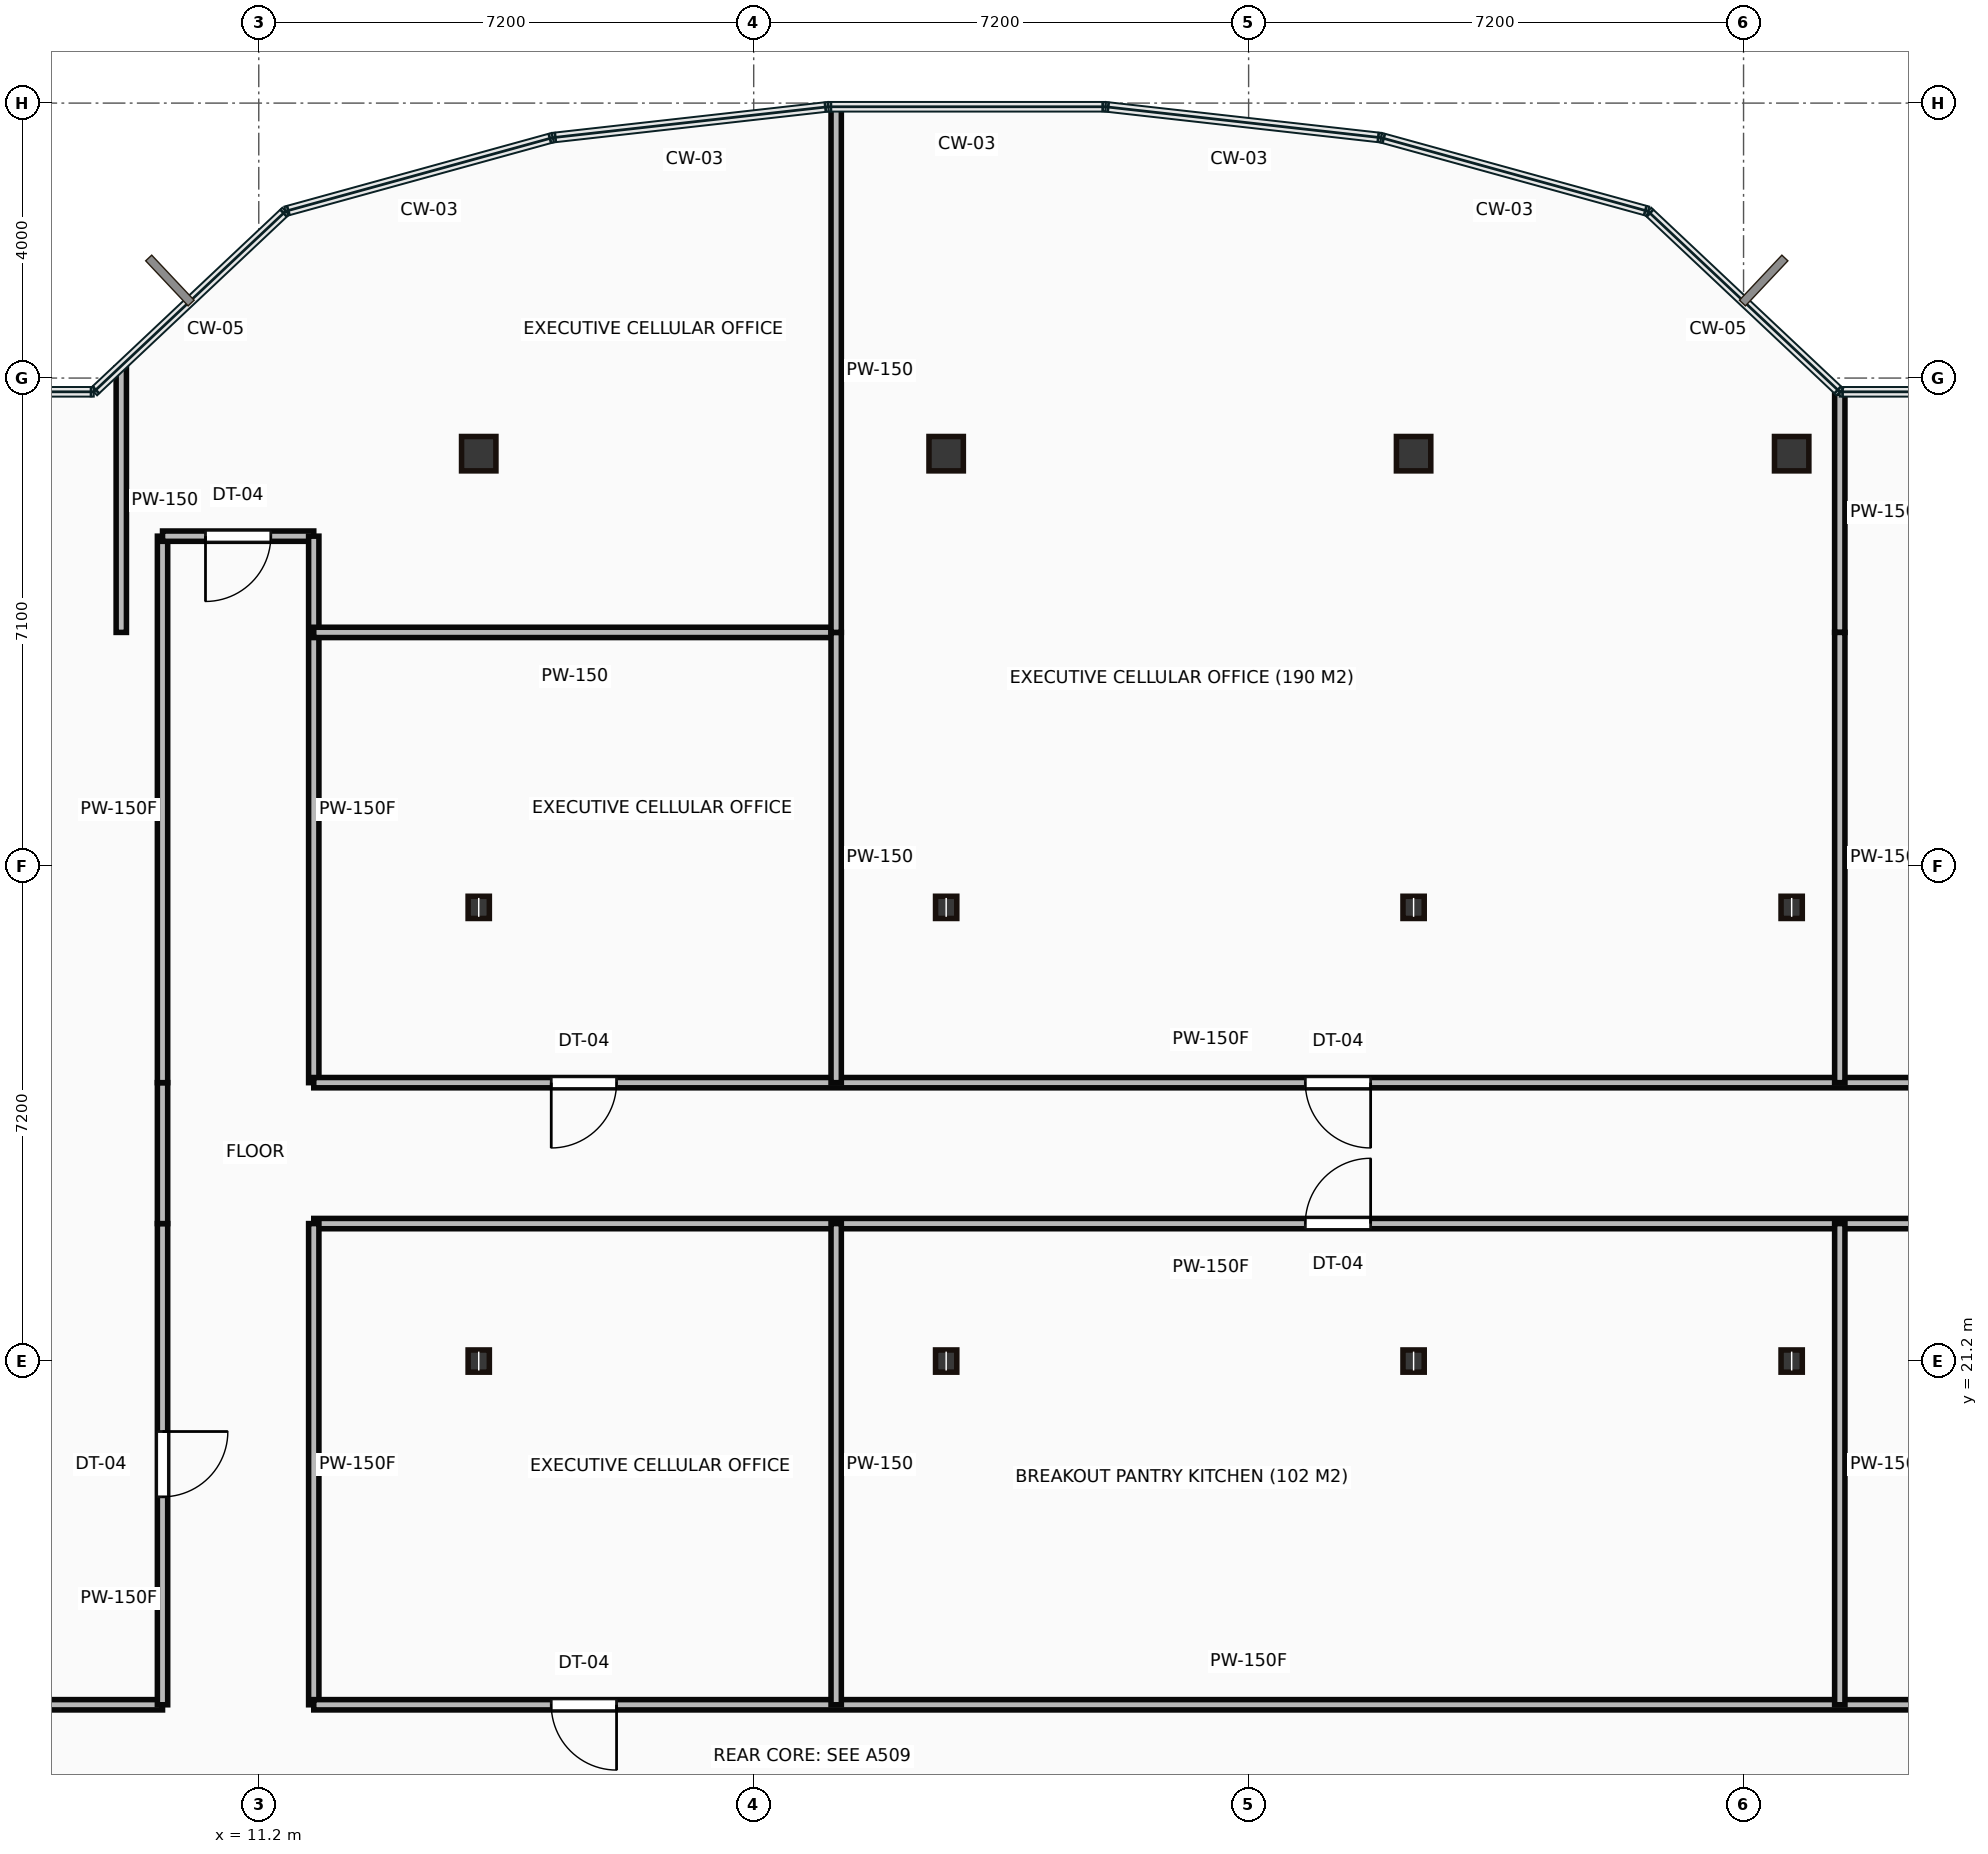
"""IFC4 building model, lengths in metres.
Left out: names, types, materials, properties, quantities, classifications, styles, units other than length and angle.
Written with IfcOpenShell. Run it as: python <this file> out.ifc"""

import sys

from ifc_helpers import new_model, si_unit, direction, frame, frame_2d, origin, origin_2d, place, context, subcontext, project, spatial, rectangle, hollow_rectangle, i_section, extrude, source, transform, mapped, element, fill, save


model = new_model("IFC4")
c1 = context("Model", 3, precision=1e-05, world=origin(), true_north=direction((0.0, 1.0)))
c2 = subcontext(c1, "Body", "Model", "MODEL_VIEW")
j1 = project(units=[si_unit("LENGTHUNIT", "METRE"), si_unit("PLANEANGLEUNIT", "RADIAN")], contexts=[c1])
p1 = place(None, origin())
s1 = spatial("IfcSite", under=j1, at=p1, CompositionType="ELEMENT")
p2 = place(p1, origin())
s2 = spatial("IfcBuilding", under=s1, at=p2, CompositionType="ELEMENT")
p3 = place(p2, frame((0.0, 0.0, 210.5)))
s3 = spatial("IfcBuildingStorey", under=s2, at=p3, CompositionType="ELEMENT", Elevation=210.5)
m1 = source(origin(), c2, "Body", "SweptSolid", [
    extrude(i_section(OverallWidth=0.309, OverallDepth=0.323, WebThickness=0.014, FlangeThickness=0.023, at=origin_2d()), origin(), (0.0, 0.0, 1.0), 3.65),
])
for number, where, z_axis, x_axis in (
    (1, (14.4, 21.2, 0.0), (0.0, 0.0, 1.0), (1.0, 0.0, 0.0)),
    (2, (14.4, 27.8, 0.0), (0.0, 0.0, 1.0), (1.0, 0.0, 0.0)),
):
    element("IfcColumn", number, at=place(p3, frame(where, z_axis=z_axis, x_axis=x_axis)), inside=s3, PredefinedType="COLUMN", context=c2, shape_type="MappedRepresentation", body=[
        mapped(m1, transform((0.0, 0.0, 0.0))),
    ])
m2 = source(origin(), c2, "Body", "SweptSolid", [
    extrude(hollow_rectangle(XDim=0.5, YDim=0.5, WallThickness=0.022, at=origin_2d()), origin(), (0.0, 0.0, 1.0), 3.65),
])
p4 = place(p3, frame((14.4, 34.4, 0.0), z_axis=(0.0, 0.0, 1.0), x_axis=(1.0, 0.0, 0.0)))
e3 = element("IfcColumn", 3, at=p4, inside=s3, PredefinedType="COLUMN", context=c2, shape_type="MappedRepresentation", body=[
    mapped(m2, transform((0.0, 0.0, 0.0))),
])
for number, where, z_axis, x_axis in (
    (4, (21.2, 21.2, 0.0), (0.0, 0.0, 1.0), (1.0, 0.0, 0.0)),
    (5, (21.2, 27.8, 0.0), (0.0, 0.0, 1.0), (1.0, 0.0, 0.0)),
):
    element("IfcColumn", number, at=place(p3, frame(where, z_axis=z_axis, x_axis=x_axis)), inside=s3, PredefinedType="COLUMN", context=c2, shape_type="MappedRepresentation", body=[
        mapped(m1, transform((0.0, 0.0, 0.0))),
    ])
p5 = place(p3, frame((21.2, 34.4, 0.0), z_axis=(0.0, 0.0, 1.0), x_axis=(1.0, 0.0, 0.0)))
e6 = element("IfcColumn", 6, at=p5, inside=s3, PredefinedType="COLUMN", context=c2, shape_type="MappedRepresentation", body=[
    mapped(m2, transform((0.0, 0.0, 0.0))),
])
for number, where, z_axis, x_axis in (
    (7, (28.0, 21.2, 0.0), (0.0, 0.0, 1.0), (1.0, 0.0, 0.0)),
    (8, (28.0, 27.8, 0.0), (0.0, 0.0, 1.0), (1.0, 0.0, 0.0)),
):
    element("IfcColumn", number, at=place(p3, frame(where, z_axis=z_axis, x_axis=x_axis)), inside=s3, PredefinedType="COLUMN", context=c2, shape_type="MappedRepresentation", body=[
        mapped(m1, transform((0.0, 0.0, 0.0))),
    ])
p6 = place(p3, frame((28.0, 34.4, 0.0), z_axis=(0.0, 0.0, 1.0), x_axis=(1.0, 0.0, 0.0)))
e9 = element("IfcColumn", 9, at=p6, inside=s3, PredefinedType="COLUMN", context=c2, shape_type="MappedRepresentation", body=[
    mapped(m2, transform((0.0, 0.0, 0.0))),
])
for number, where, z_axis, x_axis in (
    (10, (33.5, 21.2, 0.0), (0.0, 0.0, 1.0), (1.0, 0.0, 0.0)),
    (11, (33.5, 27.8, 0.0), (0.0, 0.0, 1.0), (1.0, 0.0, 0.0)),
):
    element("IfcColumn", number, at=place(p3, frame(where, z_axis=z_axis, x_axis=x_axis)), inside=s3, PredefinedType="COLUMN", context=c2, shape_type="MappedRepresentation", body=[
        mapped(m1, transform((0.0, 0.0, 0.0))),
    ])
p7 = place(p3, frame((33.5, 34.4, 0.0), z_axis=(0.0, 0.0, 1.0), x_axis=(1.0, 0.0, 0.0)))
e12 = element("IfcColumn", 12, at=p7, inside=s3, PredefinedType="COLUMN", context=c2, shape_type="MappedRepresentation", body=[
    mapped(m2, transform((0.0, 0.0, 0.0))),
])
m3 = source(origin(), c2, "Body", "SweptSolid", [
    extrude(rectangle(XDim=5.2, YDim=0.15, at=frame_2d((2.6, 0.0))), origin(), (0.0, 0.0, 1.0), 3.4),
])
p8 = place(p3, frame((4.6, 16.2, 0.0), z_axis=(0.0, 0.0, 1.0), x_axis=(1.0, 0.0, 0.0)))
e13 = element("IfcWall", 13, at=p8, inside=s3, PredefinedType="PARTITIONING", context=c2, shape_type="MappedRepresentation", body=[
    mapped(m3, transform((0.0, 0.0, 0.0))),
])
m4 = source(origin(), c2, "Body", "SweptSolid", [
    extrude(rectangle(XDim=7.0, YDim=0.15, at=frame_2d((3.5, 0.0))), origin(), (0.0, 0.0, 1.0), 3.4),
])
p9 = place(p3, frame((9.8, 16.2, 0.0), z_axis=(0.0, 0.0, 1.0), x_axis=(0.0, 1.0, 0.0)))
e14 = element("IfcWall", 14, at=p9, inside=s3, PredefinedType="PARTITIONING", context=c2, shape_type="MappedRepresentation", body=[
    mapped(m4, transform((0.0, 0.0, 0.0))),
])
p10 = place(p9, frame((3.025, 0.0, 0.0)))
e15 = element("IfcOpeningElement", 15, at=p10, cuts=e14, PredefinedType="OPENING", context=c2, shape_type="SweptSolid", body=[
    extrude(rectangle(XDim=0.95, YDim=2.15, at=frame_2d((0.475, 1.075))), frame((0.0, 0.085, 0.0), z_axis=(0.0, -1.0, 0.0), x_axis=(1.0, 0.0, 0.0)), (0.0, 0.0, 1.0), 0.17),
])
m5 = source(origin(), c2, "Body", "SweptSolid", [
    extrude(rectangle(XDim=2.05, YDim=0.15, at=frame_2d((1.025, 0.0))), origin(), (0.0, 0.0, 1.0), 3.4),
])
p11 = place(p3, frame((9.8, 23.2, 0.0), z_axis=(0.0, 0.0, 1.0), x_axis=(0.0, 1.0, 0.0)))
e16 = element("IfcWall", 16, at=p11, inside=s3, PredefinedType="PARTITIONING", context=c2, shape_type="MappedRepresentation", body=[
    mapped(m5, transform((0.0, 0.0, 0.0))),
])
m6 = source(origin(), c2, "Body", "SweptSolid", [
    extrude(rectangle(XDim=7.95, YDim=0.15, at=frame_2d((3.975, 0.0))), origin(), (0.0, 0.0, 1.0), 3.4),
])
p12 = place(p3, frame((9.8, 25.25, 0.0), z_axis=(0.0, 0.0, 1.0), x_axis=(0.0, 1.0, 0.0)))
e17 = element("IfcWall", 17, at=p12, inside=s3, PredefinedType="PARTITIONING", context=c2, shape_type="MappedRepresentation", body=[
    mapped(m6, transform((0.0, 0.0, 0.0))),
])
m7 = source(origin(), c2, "Body", "SweptSolid", [
    extrude(rectangle(XDim=2.2, YDim=0.15, at=frame_2d((1.1, 0.0))), origin(), (0.0, 0.0, 1.0), 3.4),
])
p13 = place(p3, frame((9.8, 33.2, 0.0), z_axis=(0.0, 0.0, 1.0), x_axis=(1.0, 0.0, 0.0)))
e18 = element("IfcWall", 18, at=p13, inside=s3, PredefinedType="PARTITIONING", context=c2, shape_type="MappedRepresentation", body=[
    mapped(m7, transform((0.0, 0.0, 0.0))),
])
p14 = place(p13, frame((0.625, 0.0, 0.0)))
e19 = element("IfcOpeningElement", 19, at=p14, cuts=e18, PredefinedType="OPENING", context=c2, shape_type="SweptSolid", body=[
    extrude(rectangle(XDim=0.95, YDim=2.15, at=frame_2d((0.475, 1.075))), frame((0.0, 0.085, 0.0), z_axis=(0.0, -1.0, 0.0), x_axis=(1.0, 0.0, 0.0)), (0.0, 0.0, 1.0), 0.17),
])
p15 = place(p3, frame((12.0, 33.2, 0.0), z_axis=(0.0, 0.0, 1.0), x_axis=(0.0, -1.0, 0.0)))
e20 = element("IfcWall", 20, at=p15, inside=s3, PredefinedType="PARTITIONING", context=c2, shape_type="MappedRepresentation", body=[
    mapped(m6, transform((0.0, 0.0, 0.0))),
])
m8 = source(origin(), c2, "Body", "SweptSolid", [
    extrude(rectangle(XDim=26.1, YDim=0.15, at=frame_2d((13.05, 0.0))), origin(), (0.0, 0.0, 1.0), 3.4),
])
p16 = place(p3, frame((12.0, 25.25, 0.0), z_axis=(0.0, 0.0, 1.0), x_axis=(1.0, 0.0, 0.0)))
e21 = element("IfcWall", 21, at=p16, inside=s3, PredefinedType="PARTITIONING", context=c2, shape_type="MappedRepresentation", body=[
    mapped(m8, transform((0.0, 0.0, 0.0))),
])
p17 = place(p16, frame((3.455, 0.0, 0.0)))
e22 = element("IfcOpeningElement", 22, at=p17, cuts=e21, PredefinedType="OPENING", context=c2, shape_type="SweptSolid", body=[
    extrude(rectangle(XDim=0.95, YDim=2.15, at=frame_2d((0.475, 1.075))), frame((0.0, 0.085, 0.0), z_axis=(0.0, -1.0, 0.0), x_axis=(1.0, 0.0, 0.0)), (0.0, 0.0, 1.0), 0.17),
])
p18 = place(p16, frame((14.425, 0.0, 0.0)))
e23 = element("IfcOpeningElement", 23, at=p18, cuts=e21, PredefinedType="OPENING", context=c2, shape_type="SweptSolid", body=[
    extrude(rectangle(XDim=0.95, YDim=2.15, at=frame_2d((0.475, 1.075))), frame((0.0, 0.085, 0.0), z_axis=(0.0, -1.0, 0.0), x_axis=(1.0, 0.0, 0.0)), (0.0, 0.0, 1.0), 0.17),
])
p19 = place(p16, frame((23.545, 0.0, 0.0)))
e24 = element("IfcOpeningElement", 24, at=p19, cuts=e21, PredefinedType="OPENING", context=c2, shape_type="SweptSolid", body=[
    extrude(rectangle(XDim=0.95, YDim=2.15, at=frame_2d((0.475, 1.075))), frame((0.0, 0.085, 0.0), z_axis=(0.0, -1.0, 0.0), x_axis=(1.0, 0.0, 0.0)), (0.0, 0.0, 1.0), 0.17),
])
p20 = place(p3, frame((38.1, 23.2, 0.0), z_axis=(0.0, 0.0, 1.0), x_axis=(-1.0, 0.0, 0.0)))
e25 = element("IfcWall", 25, at=p20, inside=s3, PredefinedType="PARTITIONING", context=c2, shape_type="MappedRepresentation", body=[
    mapped(m8, transform((0.0, 0.0, 0.0))),
])
p21 = place(p20, frame((10.725, 0.0, 0.0)))
e26 = element("IfcOpeningElement", 26, at=p21, cuts=e25, PredefinedType="OPENING", context=c2, shape_type="SweptSolid", body=[
    extrude(rectangle(XDim=0.95, YDim=2.15, at=frame_2d((0.475, 1.075))), frame((0.0, 0.085, 0.0), z_axis=(0.0, -1.0, 0.0), x_axis=(1.0, 0.0, 0.0)), (0.0, 0.0, 1.0), 0.17),
])
p22 = place(p3, frame((12.0, 23.2, 0.0), z_axis=(0.0, 0.0, 1.0), x_axis=(0.0, -1.0, 0.0)))
e27 = element("IfcWall", 27, at=p22, inside=s3, PredefinedType="PARTITIONING", context=c2, shape_type="MappedRepresentation", body=[
    mapped(m4, transform((0.0, 0.0, 0.0))),
])
m9 = source(origin(), c2, "Body", "SweptSolid", [
    extrude(rectangle(XDim=27.2, YDim=0.15, at=frame_2d((13.6, 0.0))), origin(), (0.0, 0.0, 1.0), 3.4),
])
p23 = place(p3, frame((12.0, 16.2, 0.0), z_axis=(0.0, 0.0, 1.0), x_axis=(1.0, 0.0, 0.0)))
e28 = element("IfcWall", 28, at=p23, inside=s3, PredefinedType="PARTITIONING", context=c2, shape_type="MappedRepresentation", body=[
    mapped(m9, transform((0.0, 0.0, 0.0))),
])
p24 = place(p23, frame((3.455, 0.0, 0.0)))
e29 = element("IfcOpeningElement", 29, at=p24, cuts=e28, PredefinedType="OPENING", context=c2, shape_type="SweptSolid", body=[
    extrude(rectangle(XDim=0.95, YDim=2.15, at=frame_2d((0.475, 1.075))), frame((0.0, 0.085, 0.0), z_axis=(0.0, -1.0, 0.0), x_axis=(1.0, 0.0, 0.0)), (0.0, 0.0, 1.0), 0.17),
])
p25 = place(p23, frame((24.095, 0.0, 0.0)))
e30 = element("IfcOpeningElement", 30, at=p25, cuts=e28, PredefinedType="OPENING", context=c2, shape_type="SweptSolid", body=[
    extrude(rectangle(XDim=0.95, YDim=2.15, at=frame_2d((0.475, 1.075))), frame((0.0, 0.085, 0.0), z_axis=(0.0, -1.0, 0.0), x_axis=(1.0, 0.0, 0.0)), (0.0, 0.0, 1.0), 0.17),
])
m10 = source(origin(), c2, "Body", "SweptSolid", [
    extrude(rectangle(XDim=3.849, YDim=0.15, at=frame_2d((1.925, 0.0))), origin(), (0.0, 0.0, 1.0), 3.4),
])
p26 = place(p3, frame((9.2, 35.649, 0.0), z_axis=(0.0, 0.0, 1.0), x_axis=(0.0, -1.0, 0.0)))
e31 = element("IfcWall", 31, at=p26, inside=s3, PredefinedType="PARTITIONING", context=c2, shape_type="MappedRepresentation", body=[
    mapped(m10, transform((0.0, 0.0, 0.0))),
])
m11 = source(origin(), c2, "Body", "SweptSolid", [
    extrude(rectangle(XDim=7.6, YDim=0.15, at=frame_2d((3.8, 0.0))), origin(), (0.0, 0.0, 1.0), 3.4),
])
p27 = place(p3, frame((19.6, 31.8, 0.0), z_axis=(0.0, 0.0, 1.0), x_axis=(-1.0, 0.0, 0.0)))
e32 = element("IfcWall", 32, at=p27, inside=s3, PredefinedType="PARTITIONING", context=c2, shape_type="MappedRepresentation", body=[
    mapped(m11, transform((0.0, 0.0, 0.0))),
])
p28 = place(p3, frame((19.6, 23.2, 0.0), z_axis=(0.0, 0.0, 1.0), x_axis=(0.0, -1.0, 0.0)))
e33 = element("IfcWall", 33, at=p28, inside=s3, PredefinedType="PARTITIONING", context=c2, shape_type="MappedRepresentation", body=[
    mapped(m4, transform((0.0, 0.0, 0.0))),
])
m12 = source(origin(), c2, "Body", "SweptSolid", [
    extrude(rectangle(XDim=6.55, YDim=0.15, at=frame_2d((3.275, 0.0))), origin(), (0.0, 0.0, 1.0), 3.4),
])
p29 = place(p3, frame((19.6, 31.8, 0.0), z_axis=(0.0, 0.0, 1.0), x_axis=(0.0, -1.0, 0.0)))
e34 = element("IfcWall", 34, at=p29, inside=s3, PredefinedType="PARTITIONING", context=c2, shape_type="MappedRepresentation", body=[
    mapped(m12, transform((0.0, 0.0, 0.0))),
])
m13 = source(origin(), c2, "Body", "SweptSolid", [
    extrude(rectangle(XDim=7.627, YDim=0.15, at=frame_2d((3.813, 0.0))), origin(), (0.0, 0.0, 1.0), 3.4),
])
p30 = place(p3, frame((19.6, 39.427, 0.0), z_axis=(0.0, 0.0, 1.0), x_axis=(0.0, -1.0, 0.0)))
e35 = element("IfcWall", 35, at=p30, inside=s3, PredefinedType="PARTITIONING", context=c2, shape_type="MappedRepresentation", body=[
    mapped(m13, transform((0.0, 0.0, 0.0))),
])
p31 = place(p3, frame((34.2, 23.2, 0.0), z_axis=(0.0, 0.0, 1.0), x_axis=(0.0, -1.0, 0.0)))
e36 = element("IfcWall", 36, at=p31, inside=s3, PredefinedType="PARTITIONING", context=c2, shape_type="MappedRepresentation", body=[
    mapped(m4, transform((0.0, 0.0, 0.0))),
])
m14 = source(origin(), c2, "Body", "SweptSolid", [
    extrude(rectangle(XDim=3.48, YDim=0.15, at=frame_2d((1.74, 0.0))), origin(), (0.0, 0.0, 1.0), 3.4),
])
p32 = place(p3, frame((34.2, 35.28, 0.0), z_axis=(0.0, 0.0, 1.0), x_axis=(0.0, -1.0, 0.0)))
e37 = element("IfcWall", 37, at=p32, inside=s3, PredefinedType="PARTITIONING", context=c2, shape_type="MappedRepresentation", body=[
    mapped(m14, transform((0.0, 0.0, 0.0))),
])
p33 = place(p3, frame((34.2, 31.8, 0.0), z_axis=(0.0, 0.0, 1.0), x_axis=(0.0, -1.0, 0.0)))
e38 = element("IfcWall", 38, at=p33, inside=s3, PredefinedType="PARTITIONING", context=c2, shape_type="MappedRepresentation", body=[
    mapped(m12, transform((0.0, 0.0, 0.0))),
])
m15 = source(origin(), c2, "Body", "SweptSolid", [
    extrude(rectangle(XDim=0.95, YDim=2.15, at=frame_2d((0.475, 1.075))), frame((0.0, 0.025, 0.0), z_axis=(0.0, -1.0, 0.0), x_axis=(1.0, 0.0, 0.0)), (0.0, 0.0, 1.0), 0.05),
])
p34 = place(p10, origin())
e39 = element("IfcDoor", 39, at=p34, inside=s3, OperationType="SINGLE_SWING_RIGHT", PredefinedType="DOOR", context=c2, shape_type="MappedRepresentation", body=[
    mapped(m15, transform((0.0, 0.0, 0.0))),
])
fill(e15, e39)
p35 = place(p14, origin())
e40 = element("IfcDoor", 40, at=p35, inside=s3, OperationType="SINGLE_SWING_LEFT", PredefinedType="DOOR", context=c2, shape_type="MappedRepresentation", body=[
    mapped(m15, transform((0.0, 0.0, 0.0))),
])
fill(e19, e40)
p36 = place(p24, origin())
e41 = element("IfcDoor", 41, at=p36, inside=s3, OperationType="SINGLE_SWING_RIGHT", PredefinedType="DOOR", context=c2, shape_type="MappedRepresentation", body=[
    mapped(m15, transform((0.0, 0.0, 0.0))),
])
fill(e29, e41)
p37 = place(p17, origin())
e42 = element("IfcDoor", 42, at=p37, inside=s3, OperationType="SINGLE_SWING_LEFT", PredefinedType="DOOR", context=c2, shape_type="MappedRepresentation", body=[
    mapped(m15, transform((0.0, 0.0, 0.0))),
])
fill(e22, e42)
p38 = place(p18, origin())
e43 = element("IfcDoor", 43, at=p38, inside=s3, OperationType="SINGLE_SWING_RIGHT", PredefinedType="DOOR", context=c2, shape_type="MappedRepresentation", body=[
    mapped(m15, transform((0.0, 0.0, 0.0))),
])
fill(e23, e43)
p39 = place(p21, origin())
e44 = element("IfcDoor", 44, at=p39, inside=s3, OperationType="SINGLE_SWING_LEFT", PredefinedType="DOOR", context=c2, shape_type="MappedRepresentation", body=[
    mapped(m15, transform((0.0, 0.0, 0.0))),
])
fill(e26, e44)
save(model, sys.argv[1])
